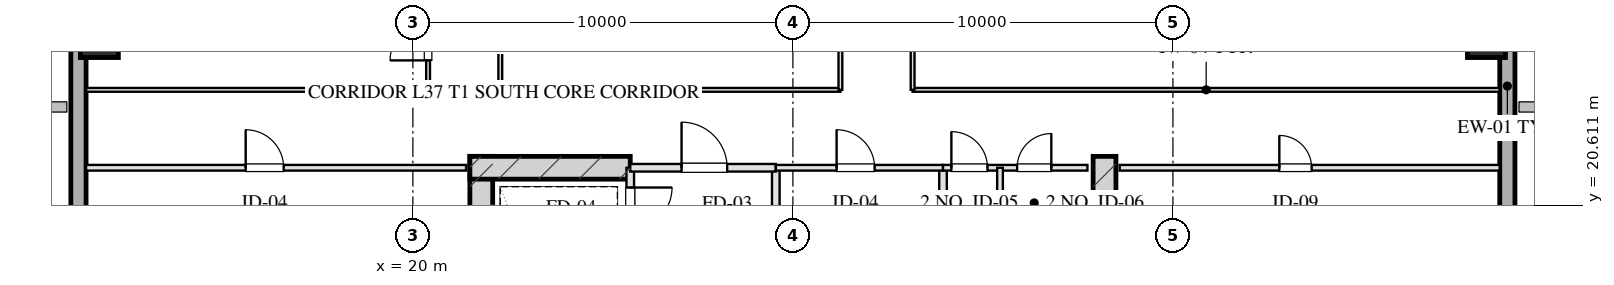
"""IFC4 building model, lengths in metres.
Left out: names, types, materials, properties, quantities, classifications, styles, units other than length and angle.
Written with IfcOpenShell. Run it as: python <this file> out.ifc"""

import sys

from ifc_helpers import new_model, si_unit, direction, frame, frame_2d, origin, origin_2d, place, context, subcontext, project, spatial, rectangle, hollow_rectangle, extrude, element, fill, save


model = new_model("IFC4")
c1 = context("Model", 3, precision=1e-05, world=origin(), true_north=direction((0.0, 1.0)))
c2 = subcontext(c1, "Body", "Model", "MODEL_VIEW")
j1 = project(units=[si_unit("LENGTHUNIT", "METRE"), si_unit("PLANEANGLEUNIT", "RADIAN")], contexts=[c1])
p1 = place(None, origin())
s1 = spatial("IfcSite", under=j1, at=p1, CompositionType="ELEMENT")
p2 = place(p1, origin())
s2 = spatial("IfcBuilding", under=s1, at=p2, CompositionType="ELEMENT")
p3 = place(p2, frame((0.0, 0.0, 142.6)))
s3 = spatial("IfcBuildingStorey", under=s2, at=p3, CompositionType="ELEMENT", Elevation=142.6)
for number, where, z_axis, x_axis in (
    (1, (21.8, 21.9, 0.0), (0.0, 0.0, 1.0), (0.0, -1.0, 0.0)),
    (2, (38.2, 21.9, 0.0), (0.0, 0.0, 1.0), (0.0, -1.0, 0.0)),
):
    element("IfcWall", number, at=place(p3, frame(where, z_axis=z_axis, x_axis=x_axis)), inside=s3, PredefinedType="SHEAR", context=c2, shape_type="SweptSolid", body=[
        extrude(rectangle(XDim=9.48, YDim=0.6, at=frame_2d((4.74, 0.0))), origin(), (0.0, 0.0, 1.0), 3.45),
    ])
p4 = place(p3, frame((21.5, 21.6, 0.0), z_axis=(0.0, 0.0, 1.0), x_axis=(1.0, 0.0, 0.0)))
e3 = element("IfcWall", 3, at=p4, inside=s3, PredefinedType="SHEAR", context=c2, shape_type="SweptSolid", body=[
    extrude(rectangle(XDim=4.22, YDim=0.6, at=frame_2d((2.11, 0.0))), origin(), (0.0, 0.0, 1.0), 3.45),
])
for number, where, z_axis, x_axis in (
    (4, (11.75, 25.0, 0.0), (0.0, 0.0, 1.0), (1.0, 0.0, 0.0)),
    (5, (48.25, 25.0, 0.0), (0.0, 0.0, 1.0), (1.0, 0.0, 0.0)),
):
    element("IfcColumn", number, at=place(p3, frame(where, z_axis=z_axis, x_axis=x_axis)), inside=s3, PredefinedType="COLUMN", context=c2, shape_type="SweptSolid", body=[
        extrude(hollow_rectangle(XDim=1.0, YDim=1.0, WallThickness=0.036, at=origin_2d()), origin(), (0.0, 0.0, 1.0), 3.451),
    ])
p5 = place(p3, frame((11.2, 9.0, 0.0), z_axis=(0.0, 0.0, 1.0), x_axis=(0.0, 1.0, 0.0)))
e6 = element("IfcWall", 6, at=p5, inside=s3, PredefinedType="SOLIDWALL", context=c2, shape_type="SweptSolid", body=[
    extrude(rectangle(XDim=50.0, YDim=0.4, at=frame_2d((25.0, 0.0))), origin(), (0.0, 0.0, 1.0), 2.61),
])
p6 = place(p5, frame((28.85, 0.0, 0.0)))
e7 = element("IfcOpeningElement", 7, at=p6, cuts=e6, PredefinedType="OPENING", context=c2, shape_type="SweptSolid", body=[
    extrude(rectangle(XDim=1.1, YDim=2.15, at=frame_2d((0.55, 1.075))), frame((0.0, 0.21, 0.0), z_axis=(0.0, -1.0, 0.0), x_axis=(1.0, 0.0, 0.0)), (0.0, 0.0, 1.0), 0.42),
])
p7 = place(p3, frame((48.8, 59.0, 0.0), z_axis=(0.0, 0.0, 1.0), x_axis=(0.0, -1.0, 0.0)))
e8 = element("IfcWall", 8, at=p7, inside=s3, PredefinedType="SOLIDWALL", context=c2, shape_type="SweptSolid", body=[
    extrude(rectangle(XDim=50.0, YDim=0.4, at=frame_2d((25.0, 0.0))), origin(), (0.0, 0.0, 1.0), 2.61),
])
p8 = place(p7, frame((30.275, 0.0, 0.75)))
e9 = element("IfcOpeningElement", 9, at=p8, cuts=e8, PredefinedType="OPENING", context=c2, shape_type="SweptSolid", body=[
    extrude(rectangle(XDim=2.25, YDim=1.46, at=frame_2d((1.125, 0.73))), frame((0.0, 0.21, 0.0), z_axis=(0.0, -1.0, 0.0), x_axis=(1.0, 0.0, 0.0)), (0.0, 0.0, 1.0), 0.42),
])
p9 = place(p7, frame((18.65, 0.0, 0.0)))
e10 = element("IfcOpeningElement", 10, at=p9, cuts=e8, PredefinedType="OPENING", context=c2, shape_type="SweptSolid", body=[
    extrude(rectangle(XDim=1.1, YDim=2.15, at=frame_2d((0.55, 1.075))), frame((0.0, 0.21, 0.0), z_axis=(0.0, -1.0, 0.0), x_axis=(1.0, 0.0, 0.0)), (0.0, 0.0, 1.0), 0.42),
])
p10 = place(p3, frame((25.72, 21.6, 0.0), z_axis=(0.0, 0.0, 1.0), x_axis=(0.0, -1.0, 0.0)))
e11 = element("IfcWall", 11, at=p10, inside=s3, PredefinedType="PARTITIONING", context=c2, shape_type="SweptSolid", body=[
    extrude(rectangle(XDim=1.9, YDim=0.2, at=frame_2d((0.95, 0.0))), origin(), (0.0, 0.0, 1.0), 3.175),
])
p11 = place(p10, frame((0.52, 0.0, 0.0)))
e12 = element("IfcOpeningElement", 12, at=p11, cuts=e11, PredefinedType="OPENING", context=c2, shape_type="SweptSolid", body=[
    extrude(rectangle(XDim=1.1, YDim=2.05, at=frame_2d((0.55, 1.025))), frame((0.0, 0.11, 0.0), z_axis=(0.0, -1.0, 0.0), x_axis=(1.0, 0.0, 0.0)), (0.0, 0.0, 1.0), 0.22),
])
p12 = place(p3, frame((29.55, 21.6, 0.0), z_axis=(0.0, 0.0, 1.0), x_axis=(0.0, -1.0, 0.0)))
e13 = element("IfcWall", 13, at=p12, inside=s3, PredefinedType="PARTITIONING", context=c2, shape_type="SweptSolid", body=[
    extrude(rectangle(XDim=8.43, YDim=0.2, at=frame_2d((4.215, 0.0))), origin(), (0.0, 0.0, 1.0), 3.175),
])
p13 = place(p3, frame((25.72, 21.6, 0.0), z_axis=(0.0, 0.0, 1.0), x_axis=(1.0, 0.0, 0.0)))
e14 = element("IfcWall", 14, at=p13, inside=s3, PredefinedType="PARTITIONING", context=c2, shape_type="SweptSolid", body=[
    extrude(rectangle(XDim=3.83, YDim=0.2, at=frame_2d((1.915, 0.0))), origin(), (0.0, 0.0, 1.0), 3.175),
])
p14 = place(p13, frame((1.35, 0.0, 0.0)))
e15 = element("IfcOpeningElement", 15, at=p14, cuts=e14, PredefinedType="OPENING", context=c2, shape_type="SweptSolid", body=[
    extrude(rectangle(XDim=1.2, YDim=2.05, at=frame_2d((0.6, 1.025))), frame((0.0, 0.11, 0.0), z_axis=(0.0, -1.0, 0.0), x_axis=(1.0, 0.0, 0.0)), (0.0, 0.0, 1.0), 0.22),
])
p15 = place(p3, frame((33.95, 21.6, 0.0), z_axis=(0.0, 0.0, 1.0), x_axis=(0.0, -1.0, 0.0)))
e16 = element("IfcWall", 16, at=p15, inside=s3, PredefinedType="PARTITIONING", context=c2, shape_type="SweptSolid", body=[
    extrude(rectangle(XDim=8.43, YDim=0.2, at=frame_2d((4.215, 0.0))), origin(), (0.0, 0.0, 1.0), 3.175),
])
p16 = place(p3, frame((29.55, 21.6, 0.0), z_axis=(0.0, 0.0, 1.0), x_axis=(1.0, 0.0, 0.0)))
e17 = element("IfcWall", 17, at=p16, inside=s3, PredefinedType="PARTITIONING", context=c2, shape_type="SweptSolid", body=[
    extrude(rectangle(XDim=4.4, YDim=0.15, at=frame_2d((2.2, 0.0))), origin(), (0.0, 0.0, 1.0), 3.175),
])
p17 = place(p16, frame((1.6, 0.0, 0.0)))
e18 = element("IfcOpeningElement", 18, at=p17, cuts=e17, PredefinedType="OPENING", context=c2, shape_type="SweptSolid", body=[
    extrude(rectangle(XDim=1.0, YDim=2.05, at=frame_2d((0.5, 1.025))), frame((0.0, 0.085, 0.0), z_axis=(0.0, -1.0, 0.0), x_axis=(1.0, 0.0, 0.0)), (0.0, 0.0, 1.0), 0.17),
])
p18 = place(p3, frame((33.95, 21.6, 0.0), z_axis=(0.0, 0.0, 1.0), x_axis=(1.0, 0.0, 0.0)))
e19 = element("IfcWall", 19, at=p18, inside=s3, PredefinedType="PARTITIONING", context=c2, shape_type="SweptSolid", body=[
    extrude(rectangle(XDim=3.8, YDim=0.15, at=frame_2d((1.9, 0.0))), origin(), (0.0, 0.0, 1.0), 3.175),
])
p19 = place(p18, frame((0.22, 0.0, 0.0)))
e20 = element("IfcOpeningElement", 20, at=p19, cuts=e19, PredefinedType="OPENING", context=c2, shape_type="SweptSolid", body=[
    extrude(rectangle(XDim=0.95, YDim=2.05, at=frame_2d((0.475, 1.025))), frame((0.0, 0.085, 0.0), z_axis=(0.0, -1.0, 0.0), x_axis=(1.0, 0.0, 0.0)), (0.0, 0.0, 1.0), 0.17),
])
p20 = place(p18, frame((1.95, 0.0, 0.0)))
e21 = element("IfcOpeningElement", 21, at=p20, cuts=e19, PredefinedType="OPENING", context=c2, shape_type="SweptSolid", body=[
    extrude(rectangle(XDim=0.9, YDim=2.05, at=frame_2d((0.45, 1.025))), frame((0.0, 0.085, 0.0), z_axis=(0.0, -1.0, 0.0), x_axis=(1.0, 0.0, 0.0)), (0.0, 0.0, 1.0), 0.17),
])
p21 = place(p3, frame((35.45, 21.6, 0.0), z_axis=(0.0, 0.0, 1.0), x_axis=(0.0, -1.0, 0.0)))
e22 = element("IfcWall", 22, at=p21, inside=s3, PredefinedType="PARTITIONING", context=c2, shape_type="SweptSolid", body=[
    extrude(rectangle(XDim=8.43, YDim=0.15, at=frame_2d((4.215, 0.0))), origin(), (0.0, 0.0, 1.0), 2.815),
])
p22 = place(p21, frame((2.55, 0.0, 0.0)))
e23 = element("IfcOpeningElement", 23, at=p22, cuts=e22, PredefinedType="OPENING", context=c2, shape_type="SweptSolid", body=[
    extrude(rectangle(XDim=0.95, YDim=2.05, at=frame_2d((0.475, 1.025))), frame((0.0, 0.085, 0.0), z_axis=(0.0, -1.0, 0.0), x_axis=(1.0, 0.0, 0.0)), (0.0, 0.0, 1.0), 0.17),
])
p23 = place(p21, frame((5.6, 0.0, 0.0)))
e24 = element("IfcOpeningElement", 24, at=p23, cuts=e22, PredefinedType="OPENING", context=c2, shape_type="SweptSolid", body=[
    extrude(rectangle(XDim=0.9, YDim=2.05, at=frame_2d((0.45, 1.025))), frame((0.0, 0.085, 0.0), z_axis=(0.0, -1.0, 0.0), x_axis=(1.0, 0.0, 0.0)), (0.0, 0.0, 1.0), 0.17),
])
p24 = place(p3, frame((11.4, 21.6, 0.0), z_axis=(0.0, 0.0, 1.0), x_axis=(1.0, 0.0, 0.0)))
e25 = element("IfcWall", 25, at=p24, inside=s3, PredefinedType="PARTITIONING", context=c2, shape_type="SweptSolid", body=[
    extrude(rectangle(XDim=10.0, YDim=0.15, at=frame_2d((5.0, 0.0))), origin(), (0.0, 0.0, 1.0), 3.175),
])
p25 = place(p24, frame((4.2, 0.0, 0.0)))
e26 = element("IfcOpeningElement", 26, at=p25, cuts=e25, PredefinedType="OPENING", context=c2, shape_type="SweptSolid", body=[
    extrude(rectangle(XDim=1.0, YDim=2.05, at=frame_2d((0.5, 1.025))), frame((0.0, 0.085, 0.0), z_axis=(0.0, -1.0, 0.0), x_axis=(1.0, 0.0, 0.0)), (0.0, 0.0, 1.0), 0.17),
])
p26 = place(p3, frame((38.6, 21.6, 0.0), z_axis=(0.0, 0.0, 1.0), x_axis=(1.0, 0.0, 0.0)))
e27 = element("IfcWall", 27, at=p26, inside=s3, PredefinedType="PARTITIONING", context=c2, shape_type="SweptSolid", body=[
    extrude(rectangle(XDim=10.0, YDim=0.15, at=frame_2d((5.0, 0.0))), origin(), (0.0, 0.0, 1.0), 3.175),
])
p27 = place(p26, frame((4.2, 0.0, 0.0)))
e28 = element("IfcOpeningElement", 28, at=p27, cuts=e27, PredefinedType="OPENING", context=c2, shape_type="SweptSolid", body=[
    extrude(rectangle(XDim=0.85, YDim=2.05, at=frame_2d((0.425, 1.025))), frame((0.0, 0.085, 0.0), z_axis=(0.0, -1.0, 0.0), x_axis=(1.0, 0.0, 0.0)), (0.0, 0.0, 1.0), 0.17),
])
p28 = place(p3, frame((11.4, 23.65, 0.0), z_axis=(0.0, 0.0, 1.0), x_axis=(1.0, 0.0, 0.0)))
e29 = element("IfcWall", 29, at=p28, inside=s3, PredefinedType="MOVABLE", context=c2, shape_type="SweptSolid", body=[
    extrude(rectangle(XDim=9.0, YDim=0.1, at=frame_2d((4.5, 0.0))), origin(), (0.0, 0.0, 1.0), 3.175),
])
p29 = place(p3, frame((22.3, 23.65, 0.0), z_axis=(0.0, 0.0, 1.0), x_axis=(1.0, 0.0, 0.0)))
e30 = element("IfcWall", 30, at=p29, inside=s3, PredefinedType="MOVABLE", context=c2, shape_type="SweptSolid", body=[
    extrude(rectangle(XDim=8.95, YDim=0.1, at=frame_2d((4.475, 0.0))), origin(), (0.0, 0.0, 1.0), 3.175),
])
p30 = place(p3, frame((33.15, 23.65, 0.0), z_axis=(0.0, 0.0, 1.0), x_axis=(1.0, 0.0, 0.0)))
e31 = element("IfcWall", 31, at=p30, inside=s3, PredefinedType="MOVABLE", context=c2, shape_type="SweptSolid", body=[
    extrude(rectangle(XDim=15.45, YDim=0.1, at=frame_2d((7.725, 0.0))), origin(), (0.0, 0.0, 1.0), 3.175),
])
p31 = place(p3, frame((20.4, 23.65, 0.0), z_axis=(0.0, 0.0, 1.0), x_axis=(0.0, 1.0, 0.0)))
e32 = element("IfcWall", 32, at=p31, inside=s3, PredefinedType="MOVABLE", context=c2, shape_type="SweptSolid", body=[
    extrude(rectangle(XDim=20.7, YDim=0.1, at=frame_2d((10.35, 0.0))), origin(), (0.0, 0.0, 1.0), 3.175),
])
p32 = place(p31, frame((0.775, 0.0, 0.0)))
e33 = element("IfcOpeningElement", 33, at=p32, cuts=e32, PredefinedType="OPENING", context=c2, shape_type="SweptSolid", body=[
    extrude(rectangle(XDim=1.0, YDim=2.05, at=frame_2d((0.5, 1.025))), frame((0.0, 0.06, 0.0), z_axis=(0.0, -1.0, 0.0), x_axis=(1.0, 0.0, 0.0)), (0.0, 0.0, 1.0), 0.12),
])
p33 = place(p31, frame((5.35, 0.0, 0.0)))
e34 = element("IfcOpeningElement", 34, at=p33, cuts=e32, PredefinedType="OPENING", context=c2, shape_type="SweptSolid", body=[
    extrude(rectangle(XDim=1.0, YDim=2.05, at=frame_2d((0.5, 1.025))), frame((0.0, 0.06, 0.0), z_axis=(0.0, -1.0, 0.0), x_axis=(1.0, 0.0, 0.0)), (0.0, 0.0, 1.0), 0.12),
])
p34 = place(p31, frame((9.85, 0.0, 0.0)))
e35 = element("IfcOpeningElement", 35, at=p34, cuts=e32, PredefinedType="OPENING", context=c2, shape_type="SweptSolid", body=[
    extrude(rectangle(XDim=1.0, YDim=2.05, at=frame_2d((0.5, 1.025))), frame((0.0, 0.06, 0.0), z_axis=(0.0, -1.0, 0.0), x_axis=(1.0, 0.0, 0.0)), (0.0, 0.0, 1.0), 0.12),
])
p35 = place(p31, frame((14.35, 0.0, 0.0)))
e36 = element("IfcOpeningElement", 36, at=p35, cuts=e32, PredefinedType="OPENING", context=c2, shape_type="SweptSolid", body=[
    extrude(rectangle(XDim=1.0, YDim=2.05, at=frame_2d((0.5, 1.025))), frame((0.0, 0.06, 0.0), z_axis=(0.0, -1.0, 0.0), x_axis=(1.0, 0.0, 0.0)), (0.0, 0.0, 1.0), 0.12),
])
p36 = place(p31, frame((18.925, 0.0, 0.0)))
e37 = element("IfcOpeningElement", 37, at=p36, cuts=e32, PredefinedType="OPENING", context=c2, shape_type="SweptSolid", body=[
    extrude(rectangle(XDim=1.0, YDim=2.05, at=frame_2d((0.5, 1.025))), frame((0.0, 0.06, 0.0), z_axis=(0.0, -1.0, 0.0), x_axis=(1.0, 0.0, 0.0)), (0.0, 0.0, 1.0), 0.12),
])
p37 = place(p3, frame((22.3, 23.65, 0.0), z_axis=(0.0, 0.0, 1.0), x_axis=(0.0, 1.0, 0.0)))
e38 = element("IfcWall", 38, at=p37, inside=s3, PredefinedType="MOVABLE", context=c2, shape_type="SweptSolid", body=[
    extrude(rectangle(XDim=20.7, YDim=0.1, at=frame_2d((10.35, 0.0))), origin(), (0.0, 0.0, 1.0), 3.175),
])
p38 = place(p37, frame((2.857, 0.0, 0.0)))
e39 = element("IfcOpeningElement", 39, at=p38, cuts=e38, PredefinedType="OPENING", context=c2, shape_type="SweptSolid", body=[
    extrude(rectangle(XDim=1.1, YDim=2.05, at=frame_2d((0.55, 1.025))), frame((0.0, 0.06, 0.0), z_axis=(0.0, -1.0, 0.0), x_axis=(1.0, 0.0, 0.0)), (0.0, 0.0, 1.0), 0.12),
])
p39 = place(p37, frame((17.208, 0.0, 0.0)))
e40 = element("IfcOpeningElement", 40, at=p39, cuts=e38, PredefinedType="OPENING", context=c2, shape_type="SweptSolid", body=[
    extrude(rectangle(XDim=1.1, YDim=2.05, at=frame_2d((0.55, 1.025))), frame((0.0, 0.06, 0.0), z_axis=(0.0, -1.0, 0.0), x_axis=(1.0, 0.0, 0.0)), (0.0, 0.0, 1.0), 0.12),
])
p40 = place(p3, frame((31.25, 23.65, 0.0), z_axis=(0.0, 0.0, 1.0), x_axis=(0.0, 1.0, 0.0)))
e41 = element("IfcWall", 41, at=p40, inside=s3, PredefinedType="MOVABLE", context=c2, shape_type="SweptSolid", body=[
    extrude(rectangle(XDim=20.7, YDim=0.1, at=frame_2d((10.35, 0.0))), origin(), (0.0, 0.0, 1.0), 3.175),
])
p41 = place(p40, frame((9.71, 0.0, 0.0)))
e42 = element("IfcOpeningElement", 42, at=p41, cuts=e41, PredefinedType="OPENING", context=c2, shape_type="SweptSolid", body=[
    extrude(rectangle(XDim=1.1, YDim=2.05, at=frame_2d((0.55, 1.025))), frame((0.0, 0.06, 0.0), z_axis=(0.0, -1.0, 0.0), x_axis=(1.0, 0.0, 0.0)), (0.0, 0.0, 1.0), 0.12),
])
p42 = place(p3, frame((33.15, 23.65, 0.0), z_axis=(0.0, 0.0, 1.0), x_axis=(0.0, 1.0, 0.0)))
e43 = element("IfcWall", 43, at=p42, inside=s3, PredefinedType="MOVABLE", context=c2, shape_type="SweptSolid", body=[
    extrude(rectangle(XDim=20.7, YDim=0.1, at=frame_2d((10.35, 0.0))), origin(), (0.0, 0.0, 1.0), 3.175),
])
p43 = place(p42, frame((2.667, 0.0, 0.0)))
e44 = element("IfcOpeningElement", 44, at=p43, cuts=e43, PredefinedType="OPENING", context=c2, shape_type="SweptSolid", body=[
    extrude(rectangle(XDim=0.85, YDim=2.05, at=frame_2d((0.425, 1.025))), frame((0.0, 0.06, 0.0), z_axis=(0.0, -1.0, 0.0), x_axis=(1.0, 0.0, 0.0)), (0.0, 0.0, 1.0), 0.12),
])
p44 = place(p42, frame((9.843, 0.0, 0.0)))
e45 = element("IfcOpeningElement", 45, at=p44, cuts=e43, PredefinedType="OPENING", context=c2, shape_type="SweptSolid", body=[
    extrude(rectangle(XDim=1.0, YDim=2.05, at=frame_2d((0.5, 1.025))), frame((0.0, 0.06, 0.0), z_axis=(0.0, -1.0, 0.0), x_axis=(1.0, 0.0, 0.0)), (0.0, 0.0, 1.0), 0.12),
])
p45 = place(p42, frame((17.025, 0.0, 0.0)))
e46 = element("IfcOpeningElement", 46, at=p45, cuts=e43, PredefinedType="OPENING", context=c2, shape_type="SweptSolid", body=[
    extrude(rectangle(XDim=1.0, YDim=2.05, at=frame_2d((0.5, 1.025))), frame((0.0, 0.06, 0.0), z_axis=(0.0, -1.0, 0.0), x_axis=(1.0, 0.0, 0.0)), (0.0, 0.0, 1.0), 0.12),
])
p46 = place(p11, origin())
e47 = element("IfcDoor", 47, at=p46, inside=s3, OperationType="SINGLE_SWING_LEFT", PredefinedType="DOOR", context=c2, shape_type="SweptSolid", body=[
    extrude(rectangle(XDim=1.1, YDim=2.05, at=frame_2d((0.55, 1.025))), frame((0.0, 0.025, 0.0), z_axis=(0.0, -1.0, 0.0), x_axis=(1.0, 0.0, 0.0)), (0.0, 0.0, 1.0), 0.05),
])
fill(e12, e47)
p47 = place(p14, origin())
e48 = element("IfcDoor", 48, at=p47, inside=s3, OperationType="SINGLE_SWING_LEFT", PredefinedType="DOOR", context=c2, shape_type="SweptSolid", body=[
    extrude(rectangle(XDim=1.2, YDim=2.05, at=frame_2d((0.6, 1.025))), frame((0.0, 0.025, 0.0), z_axis=(0.0, -1.0, 0.0), x_axis=(1.0, 0.0, 0.0)), (0.0, 0.0, 1.0), 0.05),
])
fill(e15, e48)
p48 = place(p17, origin())
e49 = element("IfcDoor", 49, at=p48, inside=s3, OperationType="SINGLE_SWING_LEFT", PredefinedType="DOOR", context=c2, shape_type="SweptSolid", body=[
    extrude(rectangle(XDim=1.0, YDim=2.05, at=frame_2d((0.5, 1.025))), frame((0.0, 0.025, 0.0), z_axis=(0.0, -1.0, 0.0), x_axis=(1.0, 0.0, 0.0)), (0.0, 0.0, 1.0), 0.05),
])
fill(e18, e49)
p49 = place(p19, origin())
e50 = element("IfcDoor", 50, at=p49, inside=s3, OperationType="SINGLE_SWING_LEFT", PredefinedType="DOOR", context=c2, shape_type="SweptSolid", body=[
    extrude(rectangle(XDim=0.95, YDim=2.05, at=frame_2d((0.475, 1.025))), frame((0.0, 0.025, 0.0), z_axis=(0.0, -1.0, 0.0), x_axis=(1.0, 0.0, 0.0)), (0.0, 0.0, 1.0), 0.05),
])
fill(e20, e50)
p50 = place(p20, origin())
e51 = element("IfcDoor", 51, at=p50, inside=s3, OperationType="SINGLE_SWING_RIGHT", PredefinedType="DOOR", context=c2, shape_type="SweptSolid", body=[
    extrude(rectangle(XDim=0.9, YDim=2.05, at=frame_2d((0.45, 1.025))), frame((0.0, 0.025, 0.0), z_axis=(0.0, -1.0, 0.0), x_axis=(1.0, 0.0, 0.0)), (0.0, 0.0, 1.0), 0.05),
])
fill(e21, e51)
p51 = place(p25, origin())
e52 = element("IfcDoor", 52, at=p51, inside=s3, OperationType="SINGLE_SWING_LEFT", PredefinedType="DOOR", context=c2, shape_type="SweptSolid", body=[
    extrude(rectangle(XDim=1.0, YDim=2.05, at=frame_2d((0.5, 1.025))), frame((0.0, 0.025, 0.0), z_axis=(0.0, -1.0, 0.0), x_axis=(1.0, 0.0, 0.0)), (0.0, 0.0, 1.0), 0.05),
])
fill(e26, e52)
p52 = place(p27, origin())
e53 = element("IfcDoor", 53, at=p52, inside=s3, OperationType="SINGLE_SWING_LEFT", PredefinedType="DOOR", context=c2, shape_type="SweptSolid", body=[
    extrude(rectangle(XDim=0.85, YDim=2.05, at=frame_2d((0.425, 1.025))), frame((0.0, 0.025, 0.0), z_axis=(0.0, -1.0, 0.0), x_axis=(1.0, 0.0, 0.0)), (0.0, 0.0, 1.0), 0.05),
])
fill(e28, e53)
p53 = place(p32, origin())
e54 = element("IfcDoor", 54, at=p53, inside=s3, OperationType="SINGLE_SWING_LEFT", PredefinedType="DOOR", context=c2, shape_type="SweptSolid", body=[
    extrude(rectangle(XDim=1.0, YDim=2.05, at=frame_2d((0.5, 1.025))), frame((0.0, 0.025, 0.0), z_axis=(0.0, -1.0, 0.0), x_axis=(1.0, 0.0, 0.0)), (0.0, 0.0, 1.0), 0.05),
])
fill(e33, e54)
save(model, sys.argv[1])
